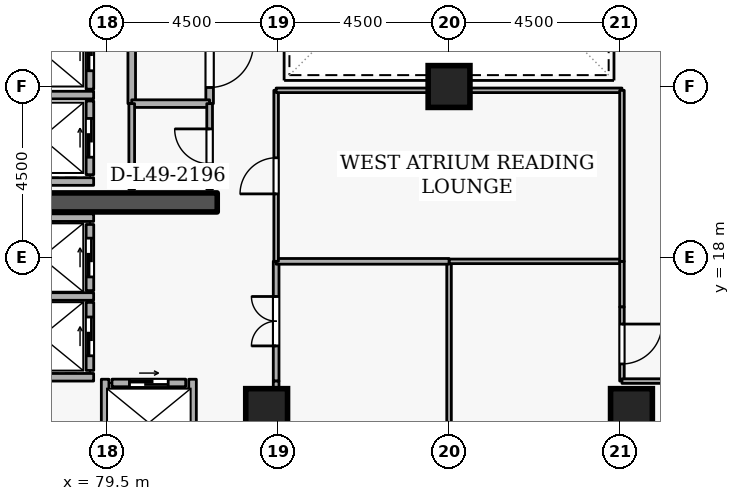
"""IFC4 building model, lengths in metres.
Left out: names, types, materials, properties, quantities, classifications, styles, units other than length and angle.
Written with IfcOpenShell. Run it as: python <this file> out.ifc"""

import sys

from ifc_helpers import new_model, si_unit, direction, frame, frame_2d, origin, origin_2d, place, context, subcontext, project, spatial, rectangle, extrude, element, fill, save


model = new_model("IFC4")
c1 = context("Model", 3, precision=1e-05, world=origin(), true_north=direction((0.0, 1.0)))
c2 = subcontext(c1, "Body", "Model", "MODEL_VIEW")
j1 = project(units=[si_unit("LENGTHUNIT", "METRE"), si_unit("PLANEANGLEUNIT", "RADIAN")], contexts=[c1])
p1 = place(None, origin())
s1 = spatial("IfcSite", under=j1, at=p1, CompositionType="ELEMENT")
p2 = place(p1, origin())
s2 = spatial("IfcBuilding", under=s1, at=p2, CompositionType="ELEMENT")
p3 = place(p2, frame((0.0, 0.0, 185.7)))
s3 = spatial("IfcBuildingStorey", under=s2, at=p3, CompositionType="ELEMENT", Elevation=185.7)
p4 = place(p3, frame((76.6, 19.45, 0.0), z_axis=(0.0, 0.0, 1.0), x_axis=(1.0, 0.0, 0.0)))
e1 = element("IfcWall", 1, at=p4, inside=s3, PredefinedType="SHEAR", context=c2, shape_type="SweptSolid", body=[
    extrude(rectangle(XDim=5.8, YDim=0.5, at=frame_2d((2.9, 0.0))), origin(), (0.0, 0.0, 1.0), 3.6),
])
for number, where, z_axis, x_axis in (
    (2, (93.3, 14.0, 0.0), (0.0, 0.0, 1.0), (1.0, 0.0, 0.0)),
    (3, (83.7, 14.0, 0.0), (0.0, 0.0, 1.0), (1.0, 0.0, 0.0)),
    (4, (88.5, 22.5, 0.0), (0.0, 0.0, 1.0), (1.0, 0.0, 0.0)),
):
    element("IfcColumn", number, at=place(p3, frame(where, z_axis=z_axis, x_axis=x_axis)), inside=s3, PredefinedType="COLUMN", context=c2, shape_type="SweptSolid", body=[
        extrude(rectangle(XDim=1.1, YDim=1.1, at=origin_2d()), origin(), (0.0, 0.0, 1.0), 3.6),
    ])
p5 = place(p3, frame((79.05, 22.43, 0.0), z_axis=(0.0, 0.0, 1.0), x_axis=(0.0, 1.0, 0.0)))
e5 = element("IfcWall", 5, at=p5, inside=s3, PredefinedType="STANDARD", context=c2, shape_type="SweptSolid", body=[
    extrude(rectangle(XDim=1.99, YDim=0.2, at=frame_2d((0.995, 0.0))), origin(), (0.0, 0.0, 1.0), 3.34),
])
p6 = place(p5, frame((0.485, 0.0, 0.0)))
e6 = element("IfcOpeningElement", 6, at=p6, cuts=e5, PredefinedType="OPENING", context=c2, shape_type="SweptSolid", body=[
    extrude(rectangle(XDim=1.02, YDim=2.06, at=frame_2d((0.51, 1.03))), frame((0.0, 0.11, 0.0), z_axis=(0.0, -1.0, 0.0), x_axis=(1.0, 0.0, 0.0)), (0.0, 0.0, 1.0), 0.22),
])
p7 = place(p3, frame((79.05, 20.18, 0.0), z_axis=(0.0, 0.0, 1.0), x_axis=(0.0, 1.0, 0.0)))
e7 = element("IfcWall", 7, at=p7, inside=s3, PredefinedType="STANDARD", context=c2, shape_type="SweptSolid", body=[
    extrude(rectangle(XDim=1.94, YDim=0.2, at=frame_2d((0.97, 0.0))), origin(), (0.0, 0.0, 1.0), 3.34),
])
p8 = place(p7, frame((0.46, 0.0, 0.0)))
e8 = element("IfcOpeningElement", 8, at=p8, cuts=e7, PredefinedType="OPENING", context=c2, shape_type="SweptSolid", body=[
    extrude(rectangle(XDim=1.02, YDim=2.06, at=frame_2d((0.51, 1.03))), frame((0.0, 0.11, 0.0), z_axis=(0.0, -1.0, 0.0), x_axis=(1.0, 0.0, 0.0)), (0.0, 0.0, 1.0), 0.22),
])
p9 = place(p3, frame((79.05, 17.13, 0.0), z_axis=(0.0, 0.0, 1.0), x_axis=(0.0, 1.0, 0.0)))
e9 = element("IfcWall", 9, at=p9, inside=s3, PredefinedType="STANDARD", context=c2, shape_type="SweptSolid", body=[
    extrude(rectangle(XDim=1.74, YDim=0.2, at=frame_2d((0.87, 0.0))), origin(), (0.0, 0.0, 1.0), 3.34),
])
p10 = place(p9, frame((0.36, 0.0, 0.0)))
e10 = element("IfcOpeningElement", 10, at=p10, cuts=e9, PredefinedType="OPENING", context=c2, shape_type="SweptSolid", body=[
    extrude(rectangle(XDim=1.02, YDim=2.06, at=frame_2d((0.51, 1.03))), frame((0.0, 0.11, 0.0), z_axis=(0.0, -1.0, 0.0), x_axis=(1.0, 0.0, 0.0)), (0.0, 0.0, 1.0), 0.22),
])
p11 = place(p3, frame((79.05, 15.03, 0.0), z_axis=(0.0, 0.0, 1.0), x_axis=(0.0, 1.0, 0.0)))
e11 = element("IfcWall", 11, at=p11, inside=s3, PredefinedType="STANDARD", context=c2, shape_type="SweptSolid", body=[
    extrude(rectangle(XDim=1.79, YDim=0.2, at=frame_2d((0.895, 0.0))), origin(), (0.0, 0.0, 1.0), 3.34),
])
p12 = place(p11, frame((0.385, 0.0, 0.0)))
e12 = element("IfcOpeningElement", 12, at=p12, cuts=e11, PredefinedType="OPENING", context=c2, shape_type="SweptSolid", body=[
    extrude(rectangle(XDim=1.02, YDim=2.06, at=frame_2d((0.51, 1.03))), frame((0.0, 0.11, 0.0), z_axis=(0.0, -1.0, 0.0), x_axis=(1.0, 0.0, 0.0)), (0.0, 0.0, 1.0), 0.22),
])
p13 = place(p3, frame((79.63, 14.7, 0.0), z_axis=(0.0, 0.0, 1.0), x_axis=(1.0, 0.0, 0.0)))
e13 = element("IfcWall", 13, at=p13, inside=s3, PredefinedType="STANDARD", context=c2, shape_type="SweptSolid", body=[
    extrude(rectangle(XDim=1.94, YDim=0.2, at=frame_2d((0.97, 0.0))), origin(), (0.0, 0.0, 1.0), 3.34),
])
p14 = place(p13, frame((0.46, 0.0, 0.0)))
e14 = element("IfcOpeningElement", 14, at=p14, cuts=e13, PredefinedType="OPENING", context=c2, shape_type="SweptSolid", body=[
    extrude(rectangle(XDim=1.02, YDim=2.06, at=frame_2d((0.51, 1.03))), frame((0.0, 0.11, 0.0), z_axis=(0.0, -1.0, 0.0), x_axis=(1.0, 0.0, 0.0)), (0.0, 0.0, 1.0), 0.22),
])
for number, where, z_axis, x_axis in (
    (15, (76.612, 22.275, 0.0), (0.0, 0.0, 1.0), (1.0, 0.0, 0.0)),
    (16, (76.612, 20.0, 0.0), (0.0, 0.0, 1.0), (1.0, 0.0, 0.0)),
):
    element("IfcWall", number, at=place(p3, frame(where, z_axis=z_axis, x_axis=x_axis)), inside=s3, PredefinedType="STANDARD", context=c2, shape_type="SweptSolid", body=[
        extrude(rectangle(XDim=2.536, YDim=0.2, at=frame_2d((1.268, 0.0))), origin(), (0.0, 0.0, 1.0), 3.34),
    ])
p15 = place(p3, frame((76.402, 19.05, 0.0), z_axis=(0.0, 0.0, 1.0), x_axis=(1.0, 0.0, 0.0)))
e17 = element("IfcWall", 17, at=p15, inside=s3, PredefinedType="STANDARD", context=c2, shape_type="SweptSolid", body=[
    extrude(rectangle(XDim=2.746, YDim=0.2, at=frame_2d((1.373, 0.0))), origin(), (0.0, 0.0, 1.0), 2.545),
])
p16 = place(p3, frame((76.402, 16.975, 0.0), z_axis=(0.0, 0.0, 1.0), x_axis=(1.0, 0.0, 0.0)))
e18 = element("IfcWall", 18, at=p16, inside=s3, PredefinedType="STANDARD", context=c2, shape_type="SweptSolid", body=[
    extrude(rectangle(XDim=2.746, YDim=0.2, at=frame_2d((1.373, 0.0))), origin(), (0.0, 0.0, 1.0), 3.34),
])
p17 = place(p3, frame((76.512, 14.85, 0.0), z_axis=(0.0, 0.0, 1.0), x_axis=(1.0, 0.0, 0.0)))
e19 = element("IfcWall", 19, at=p17, inside=s3, PredefinedType="STANDARD", context=c2, shape_type="SweptSolid", body=[
    extrude(rectangle(XDim=2.636, YDim=0.2, at=frame_2d((1.318, 0.0))), origin(), (0.0, 0.0, 1.0), 3.34),
])
for number, where, z_axis, x_axis in (
    (20, (81.75, 12.612, 0.0), (0.0, 0.0, 1.0), (0.0, 1.0, 0.0)),
    (21, (79.45, 12.612, 0.0), (0.0, 0.0, 1.0), (0.0, 1.0, 0.0)),
):
    element("IfcWall", number, at=place(p3, frame(where, z_axis=z_axis, x_axis=x_axis)), inside=s3, PredefinedType="STANDARD", context=c2, shape_type="SweptSolid", body=[
        extrude(rectangle(XDim=2.186, YDim=0.2, at=frame_2d((1.093, 0.0))), origin(), (0.0, 0.0, 1.0), 3.34),
    ])
p18 = place(p3, frame((80.15, 22.05, 0.0), z_axis=(0.0, 0.0, 1.0), x_axis=(0.0, 1.0, 0.0)))
e22 = element("IfcWall", 22, at=p18, inside=s3, PredefinedType="STANDARD", context=c2, shape_type="SweptSolid", body=[
    extrude(rectangle(XDim=2.0, YDim=0.2, at=frame_2d((1.0, 0.0))), origin(), (0.0, 0.0, 1.0), 3.34),
])
p19 = place(p3, frame((82.2, 24.05, 0.0), z_axis=(0.0, 0.0, 1.0), x_axis=(0.0, -1.0, 0.0)))
e23 = element("IfcWall", 23, at=p19, inside=s3, PredefinedType="STANDARD", context=c2, shape_type="SweptSolid", body=[
    extrude(rectangle(XDim=2.0, YDim=0.2, at=frame_2d((1.0, 0.0))), origin(), (0.0, 0.0, 1.0), 3.34),
])
p20 = place(p19, frame((0.425, 0.0, 0.0)))
e24 = element("IfcOpeningElement", 24, at=p20, cuts=e23, PredefinedType="OPENING", context=c2, shape_type="SweptSolid", body=[
    extrude(rectangle(XDim=1.15, YDim=2.1, at=frame_2d((0.575, 1.05))), frame((0.0, 0.11, 0.0), z_axis=(0.0, -1.0, 0.0), x_axis=(1.0, 0.0, 0.0)), (0.0, 0.0, 1.0), 0.22),
])
p21 = place(p3, frame((82.2, 22.05, 0.0), z_axis=(0.0, 0.0, 1.0), x_axis=(-1.0, 0.0, 0.0)))
e25 = element("IfcWall", 25, at=p21, inside=s3, PredefinedType="STANDARD", context=c2, shape_type="SweptSolid", body=[
    extrude(rectangle(XDim=2.05, YDim=0.2, at=frame_2d((1.025, 0.0))), origin(), (0.0, 0.0, 1.0), 3.34),
])
p22 = place(p3, frame((82.2, 19.8, 0.0), z_axis=(0.0, 0.0, 1.0), x_axis=(0.0, 1.0, 0.0)))
e26 = element("IfcWall", 26, at=p22, inside=s3, PredefinedType="PARTITIONING", context=c2, shape_type="SweptSolid", body=[
    extrude(rectangle(XDim=2.25, YDim=0.15, at=frame_2d((1.125, 0.0))), origin(), (0.0, 0.0, 1.0), 3.34),
])
p23 = place(p22, frame((0.665, 0.0, 0.0)))
e27 = element("IfcOpeningElement", 27, at=p23, cuts=e26, PredefinedType="OPENING", context=c2, shape_type="SweptSolid", body=[
    extrude(rectangle(XDim=0.92, YDim=2.08, at=frame_2d((0.46, 1.04))), frame((0.0, 0.085, 0.0), z_axis=(0.0, -1.0, 0.0), x_axis=(1.0, 0.0, 0.0)), (0.0, 0.0, 1.0), 0.17),
])
p24 = place(p3, frame((80.15, 22.05, 0.0), z_axis=(0.0, 0.0, 1.0), x_axis=(0.0, -1.0, 0.0)))
e28 = element("IfcWall", 28, at=p24, inside=s3, PredefinedType="PARTITIONING", context=c2, shape_type="SweptSolid", body=[
    extrude(rectangle(XDim=2.25, YDim=0.15, at=frame_2d((1.125, 0.0))), origin(), (0.0, 0.0, 1.0), 3.34),
])
p25 = place(p3, frame((88.5, 9.28, 0.0), z_axis=(0.0, 0.0, 1.0), x_axis=(0.0, 1.0, 0.0)))
e29 = element("IfcWall", 29, at=p25, inside=s3, PredefinedType="PARTITIONING", context=c2, shape_type="SweptSolid", body=[
    extrude(rectangle(XDim=8.62, YDim=0.12, at=frame_2d((4.31, 0.0))), origin(), (0.0, 0.0, 1.0), 2.878),
])
p26 = place(p3, frame((88.5, 17.9, 0.0), z_axis=(0.0, 0.0, 1.0), x_axis=(1.0, 0.0, 0.0)))
e30 = element("IfcWall", 30, at=p26, inside=s3, PredefinedType="PARTITIONING", context=c2, shape_type="SweptSolid", body=[
    extrude(rectangle(XDim=4.55, YDim=0.12, at=frame_2d((2.275, 0.0))), origin(), (0.0, 0.0, 1.0), 3.34),
])
p27 = place(p3, frame((93.05, 17.9, 0.0), z_axis=(0.0, 0.0, 1.0), x_axis=(0.0, -1.0, 0.0)))
e31 = element("IfcWall", 31, at=p27, inside=s3, PredefinedType="PARTITIONING", context=c2, shape_type="SweptSolid", body=[
    extrude(rectangle(XDim=1.2, YDim=0.12, at=frame_2d((0.6, 0.0))), origin(), (0.0, 0.0, 1.0), 3.34),
])
p28 = place(p3, frame((93.05, 16.7, 0.0), z_axis=(0.0, 0.0, 1.0), x_axis=(0.0, -1.0, 0.0)))
e32 = element("IfcWall", 32, at=p28, inside=s3, PredefinedType="PARTITIONING", context=c2, shape_type="SweptSolid", body=[
    extrude(rectangle(XDim=1.95, YDim=0.12, at=frame_2d((0.975, 0.0))), origin(), (0.0, 0.0, 1.0), 3.34),
])
p29 = place(p28, frame((0.45, 0.0, 0.0)))
e33 = element("IfcOpeningElement", 33, at=p29, cuts=e32, PredefinedType="OPENING", context=c2, shape_type="SweptSolid", body=[
    extrude(rectangle(XDim=1.05, YDim=2.1, at=frame_2d((0.525, 1.05))), frame((0.0, 0.07, 0.0), z_axis=(0.0, -1.0, 0.0), x_axis=(1.0, 0.0, 0.0)), (0.0, 0.0, 1.0), 0.14),
])
p30 = place(p3, frame((93.05, 14.75, 0.0), z_axis=(0.0, 0.0, 1.0), x_axis=(1.0, 0.0, 0.0)))
e34 = element("IfcWall", 34, at=p30, inside=s3, PredefinedType="PARTITIONING", context=c2, shape_type="SweptSolid", body=[
    extrude(rectangle(XDim=1.75, YDim=0.12, at=frame_2d((0.875, 0.0))), origin(), (0.0, 0.0, 1.0), 3.34),
])
p31 = place(p3, frame((83.95, 14.75, 0.0), z_axis=(0.0, 0.0, 1.0), x_axis=(0.0, 1.0, 0.0)))
e35 = element("IfcWall", 35, at=p31, inside=s3, PredefinedType="PARTITIONING", context=c2, shape_type="SweptSolid", body=[
    extrude(rectangle(XDim=3.15, YDim=0.15, at=frame_2d((1.575, 0.0))), origin(), (0.0, 0.0, 1.0), 3.34),
])
p32 = place(p31, frame((0.925, 0.0, 0.0)))
e36 = element("IfcOpeningElement", 36, at=p32, cuts=e35, PredefinedType="OPENING", context=c2, shape_type="SweptSolid", body=[
    extrude(rectangle(XDim=1.3, YDim=2.12, at=frame_2d((0.65, 1.06))), frame((0.0, 0.085, 0.0), z_axis=(0.0, -1.0, 0.0), x_axis=(1.0, 0.0, 0.0)), (0.0, 0.0, 1.0), 0.17),
])
p33 = place(p3, frame((83.95, 17.9, 0.0), z_axis=(0.0, 0.0, 1.0), x_axis=(1.0, 0.0, 0.0)))
e37 = element("IfcWall", 37, at=p33, inside=s3, PredefinedType="PARTITIONING", context=c2, shape_type="SweptSolid", body=[
    extrude(rectangle(XDim=4.55, YDim=0.15, at=frame_2d((2.275, 0.0))), origin(), (0.0, 0.0, 1.0), 3.34),
])
p34 = place(p3, frame((83.95, 12.4, 0.0), z_axis=(0.0, 0.0, 1.0), x_axis=(0.0, 1.0, 0.0)))
e38 = element("IfcWall", 38, at=p34, inside=s3, PredefinedType="PARTITIONING", context=c2, shape_type="SweptSolid", body=[
    extrude(rectangle(XDim=2.35, YDim=0.15, at=frame_2d((1.175, 0.0))), origin(), (0.0, 0.0, 1.0), 3.34),
])
p35 = place(p3, frame((83.95, 17.9, 0.0), z_axis=(0.0, 0.0, 1.0), x_axis=(0.0, 1.0, 0.0)))
e39 = element("IfcWall", 39, at=p35, inside=s3, PredefinedType="PARTITIONING", context=c2, shape_type="SweptSolid", body=[
    extrude(rectangle(XDim=4.5, YDim=0.12, at=frame_2d((2.25, 0.0))), origin(), (0.0, 0.0, 1.0), 3.34),
])
p36 = place(p35, frame((1.775, 0.0, 0.0)))
e40 = element("IfcOpeningElement", 40, at=p36, cuts=e39, PredefinedType="OPENING", context=c2, shape_type="SweptSolid", body=[
    extrude(rectangle(XDim=0.95, YDim=2.1, at=frame_2d((0.475, 1.05))), frame((0.0, 0.07, 0.0), z_axis=(0.0, -1.0, 0.0), x_axis=(1.0, 0.0, 0.0)), (0.0, 0.0, 1.0), 0.14),
])
p37 = place(p3, frame((83.95, 22.4, 0.0), z_axis=(0.0, 0.0, 1.0), x_axis=(1.0, 0.0, 0.0)))
e41 = element("IfcWall", 41, at=p37, inside=s3, PredefinedType="PARTITIONING", context=c2, shape_type="SweptSolid", body=[
    extrude(rectangle(XDim=9.1, YDim=0.12, at=frame_2d((4.55, 0.0))), origin(), (0.0, 0.0, 1.0), 3.34),
])
p38 = place(p3, frame((93.05, 22.4, 0.0), z_axis=(0.0, 0.0, 1.0), x_axis=(0.0, -1.0, 0.0)))
e42 = element("IfcWall", 42, at=p38, inside=s3, PredefinedType="PARTITIONING", context=c2, shape_type="SweptSolid", body=[
    extrude(rectangle(XDim=4.5, YDim=0.12, at=frame_2d((2.25, 0.0))), origin(), (0.0, 0.0, 1.0), 3.34),
])
p39 = place(p6, origin())
e43 = element("IfcDoor", 43, at=p39, inside=s3, OperationType="SLIDING_TO_LEFT", PredefinedType="DOOR", context=c2, shape_type="SweptSolid", body=[
    extrude(rectangle(XDim=1.02, YDim=2.06, at=frame_2d((0.51, 1.03))), frame((0.0, 0.025, 0.0), z_axis=(0.0, -1.0, 0.0), x_axis=(1.0, 0.0, 0.0)), (0.0, 0.0, 1.0), 0.05),
])
fill(e6, e43)
p40 = place(p8, origin())
e44 = element("IfcDoor", 44, at=p40, inside=s3, OperationType="SLIDING_TO_LEFT", PredefinedType="DOOR", context=c2, shape_type="SweptSolid", body=[
    extrude(rectangle(XDim=1.02, YDim=2.06, at=frame_2d((0.51, 1.03))), frame((0.0, 0.025, 0.0), z_axis=(0.0, -1.0, 0.0), x_axis=(1.0, 0.0, 0.0)), (0.0, 0.0, 1.0), 0.05),
])
fill(e8, e44)
p41 = place(p10, origin())
e45 = element("IfcDoor", 45, at=p41, inside=s3, OperationType="SLIDING_TO_LEFT", PredefinedType="DOOR", context=c2, shape_type="SweptSolid", body=[
    extrude(rectangle(XDim=1.02, YDim=2.06, at=frame_2d((0.51, 1.03))), frame((0.0, 0.025, 0.0), z_axis=(0.0, -1.0, 0.0), x_axis=(1.0, 0.0, 0.0)), (0.0, 0.0, 1.0), 0.05),
])
fill(e10, e45)
p42 = place(p12, origin())
e46 = element("IfcDoor", 46, at=p42, inside=s3, OperationType="SLIDING_TO_LEFT", PredefinedType="DOOR", context=c2, shape_type="SweptSolid", body=[
    extrude(rectangle(XDim=1.02, YDim=2.06, at=frame_2d((0.51, 1.03))), frame((0.0, 0.025, 0.0), z_axis=(0.0, -1.0, 0.0), x_axis=(1.0, 0.0, 0.0)), (0.0, 0.0, 1.0), 0.05),
])
fill(e12, e46)
p43 = place(p14, origin())
e47 = element("IfcDoor", 47, at=p43, inside=s3, OperationType="SLIDING_TO_LEFT", PredefinedType="DOOR", context=c2, shape_type="SweptSolid", body=[
    extrude(rectangle(XDim=1.02, YDim=2.06, at=frame_2d((0.51, 1.03))), frame((0.0, 0.025, 0.0), z_axis=(0.0, -1.0, 0.0), x_axis=(1.0, 0.0, 0.0)), (0.0, 0.0, 1.0), 0.05),
])
fill(e14, e47)
p44 = place(p23, origin())
e48 = element("IfcDoor", 48, at=p44, inside=s3, OperationType="SINGLE_SWING_RIGHT", PredefinedType="DOOR", context=c2, shape_type="SweptSolid", body=[
    extrude(rectangle(XDim=0.92, YDim=2.08, at=frame_2d((0.46, 1.04))), frame((0.0, 0.025, 0.0), z_axis=(0.0, -1.0, 0.0), x_axis=(1.0, 0.0, 0.0)), (0.0, 0.0, 1.0), 0.05),
])
fill(e27, e48)
p45 = place(p20, origin())
e49 = element("IfcDoor", 49, at=p45, inside=s3, OperationType="SINGLE_SWING_LEFT", PredefinedType="DOOR", context=c2, shape_type="SweptSolid", body=[
    extrude(rectangle(XDim=1.15, YDim=2.1, at=frame_2d((0.575, 1.05))), frame((0.0, 0.025, 0.0), z_axis=(0.0, -1.0, 0.0), x_axis=(1.0, 0.0, 0.0)), (0.0, 0.0, 1.0), 0.05),
])
fill(e24, e49)
p46 = place(p29, origin())
e50 = element("IfcDoor", 50, at=p46, inside=s3, OperationType="SINGLE_SWING_LEFT", PredefinedType="DOOR", context=c2, shape_type="SweptSolid", body=[
    extrude(rectangle(XDim=1.05, YDim=2.1, at=frame_2d((0.525, 1.05))), frame((0.0, 0.025, 0.0), z_axis=(0.0, -1.0, 0.0), x_axis=(1.0, 0.0, 0.0)), (0.0, 0.0, 1.0), 0.05),
])
fill(e33, e50)
p47 = place(p32, origin())
e51 = element("IfcDoor", 51, at=p47, inside=s3, OperationType="DOUBLE_DOOR_SINGLE_SWING", PredefinedType="DOOR", context=c2, shape_type="SweptSolid", body=[
    extrude(rectangle(XDim=1.3, YDim=2.12, at=frame_2d((0.65, 1.06))), frame((0.0, 0.025, 0.0), z_axis=(0.0, -1.0, 0.0), x_axis=(1.0, 0.0, 0.0)), (0.0, 0.0, 1.0), 0.05),
])
fill(e36, e51)
p48 = place(p36, origin())
e52 = element("IfcDoor", 52, at=p48, inside=s3, OperationType="SINGLE_SWING_LEFT", PredefinedType="DOOR", context=c2, shape_type="SweptSolid", body=[
    extrude(rectangle(XDim=0.95, YDim=2.1, at=frame_2d((0.475, 1.05))), frame((0.0, 0.025, 0.0), z_axis=(0.0, -1.0, 0.0), x_axis=(1.0, 0.0, 0.0)), (0.0, 0.0, 1.0), 0.05),
])
fill(e40, e52)
save(model, sys.argv[1])
